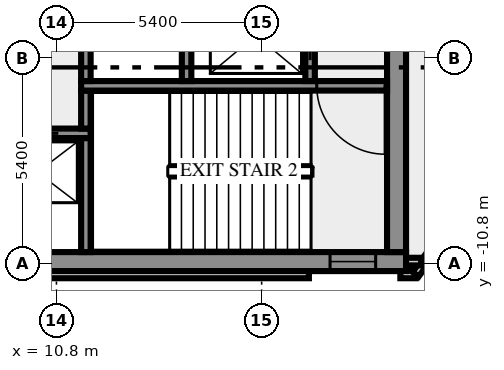
"""IFC4 building model, lengths in metres.
Left out: names, types, materials, properties, quantities, classifications, styles, units other than length and angle.
Written with IfcOpenShell. Run it as: python <this file> out.ifc"""

import sys

from ifc_helpers import new_model, si_unit, direction, frame, frame_2d, origin, place, context, subcontext, project, spatial, rectangle, extrude, element, fill, save


model = new_model("IFC4")
c1 = context("Model", 3, precision=1e-05, world=origin(), true_north=direction((0.0, 1.0)))
c2 = subcontext(c1, "Body", "Model", "MODEL_VIEW")
j1 = project(units=[si_unit("LENGTHUNIT", "METRE"), si_unit("PLANEANGLEUNIT", "RADIAN")], contexts=[c1])
p1 = place(None, origin())
s1 = spatial("IfcSite", under=j1, at=p1, CompositionType="ELEMENT")
p2 = place(p1, origin())
s2 = spatial("IfcBuilding", under=s1, at=p2, CompositionType="ELEMENT")
p3 = place(p2, frame((0.0, 0.0, 160.0)))
s3 = spatial("IfcBuildingStorey", under=s2, at=p3, CompositionType="ELEMENT", Elevation=160.0)
p4 = place(p3, frame((-17.444, -11.088, 0.0), z_axis=(0.0, 0.0, 1.0), x_axis=(1.0, 0.0, 0.0)))
e1 = element("IfcWall", 1, at=p4, inside=s3, PredefinedType="SOLIDWALL", context=c2, shape_type="SweptSolid", body=[
    extrude(rectangle(XDim=34.888, YDim=0.2, at=frame_2d((17.444, 0.0))), origin(), (0.0, 0.0, 1.0), 3.65),
])
p5 = place(p3, frame((19.85, -11.088, 0.0), z_axis=(0.0, 0.0, 1.0), x_axis=(1.0, 0.0, 0.0)))
e2 = element("IfcWall", 2, at=p5, inside=s3, PredefinedType="SOLIDWALL", context=c2, shape_type="SweptSolid", body=[
    extrude(rectangle(XDim=0.406, YDim=0.2, at=frame_2d((0.203, 0.0))), origin(), (0.0, 0.0, 1.0), 3.65),
])
p6 = place(p3, frame((20.253, -11.083, 0.0), z_axis=(0.0, 0.0, 1.0), x_axis=(0.587766567315, 0.809030569476, 0.0)))
e3 = element("IfcWall", 3, at=p6, inside=s3, PredefinedType="SOLIDWALL", context=c2, shape_type="SweptSolid", body=[
    extrude(rectangle(XDim=2.688, YDim=0.2, at=frame_2d((1.344, 0.0))), origin(), (0.0, 0.0, 1.0), 3.65),
])
p7 = place(p3, frame((19.98, -10.75, 0.0), z_axis=(0.0, 0.0, 1.0), x_axis=(1.0, 0.0, 0.0)))
e4 = element("IfcWall", 4, at=p7, inside=s3, PredefinedType="SOLIDWALL", context=c2, shape_type="SweptSolid", body=[
    extrude(rectangle(XDim=0.417, YDim=0.2, at=frame_2d((0.208, 0.0))), origin(), (0.0, 0.0, 1.0), 3.65),
])
p8 = place(p3, frame((-20.0, -10.75, 0.0), z_axis=(0.0, 0.0, 1.0), x_axis=(1.0, 0.0, 0.0)))
e5 = element("IfcWall", 5, at=p8, inside=s3, PredefinedType="SHEAR", context=c2, shape_type="SweptSolid", body=[
    extrude(rectangle(XDim=40.0, YDim=0.5, at=frame_2d((20.0, 0.0))), origin(), (0.0, 0.0, 1.0), 3.65),
])
p9 = place(p8, frame((0.8, 0.0, 1.0)))
e6 = element("IfcOpeningElement", 6, at=p9, cuts=e5, PredefinedType="OPENING", context=c2, shape_type="SweptSolid", body=[
    extrude(rectangle(XDim=1.2, YDim=1.2, at=frame_2d((0.6, 0.6))), frame((0.0, 0.26, 0.0), z_axis=(0.0, -1.0, 0.0), x_axis=(1.0, 0.0, 0.0)), (0.0, 0.0, 1.0), 0.52),
])
p10 = place(p8, frame((38.0, 0.0, 1.0)))
e7 = element("IfcOpeningElement", 7, at=p10, cuts=e5, PredefinedType="OPENING", context=c2, shape_type="SweptSolid", body=[
    extrude(rectangle(XDim=1.2, YDim=1.2, at=frame_2d((0.6, 0.6))), frame((0.0, 0.26, 0.0), z_axis=(0.0, -1.0, 0.0), x_axis=(1.0, 0.0, 0.0)), (0.0, 0.0, 1.0), 0.52),
])
p11 = place(p3, frame((11.575, -10.5, 0.0), z_axis=(0.0, 0.0, 1.0), x_axis=(0.0, 1.0, 0.0)))
e8 = element("IfcWall", 8, at=p11, inside=s3, PredefinedType="SHEAR", context=c2, shape_type="SweptSolid", body=[
    extrude(rectangle(XDim=3.0, YDim=0.25, at=frame_2d((1.5, 0.0))), origin(), (0.0, 0.0, 1.0), 3.65),
])
p12 = place(p3, frame((19.75, -10.5, 0.0), z_axis=(0.0, 0.0, 1.0), x_axis=(0.0, 1.0, 0.0)))
e9 = element("IfcWall", 9, at=p12, inside=s3, PredefinedType="SHEAR", context=c2, shape_type="SweptSolid", body=[
    extrude(rectangle(XDim=8.8, YDim=0.5, at=frame_2d((4.4, 0.0))), origin(), (0.0, 0.0, 1.0), 3.65),
])
p13 = place(p3, frame((11.7, -7.375, 0.0), z_axis=(0.0, 0.0, 1.0), x_axis=(-1.0, 0.0, 0.0)))
e10 = element("IfcWall", 10, at=p13, inside=s3, PredefinedType="SHEAR", context=c2, shape_type="SweptSolid", body=[
    extrude(rectangle(XDim=23.4, YDim=0.25, at=frame_2d((11.7, 0.0))), origin(), (0.0, 0.0, 1.0), 3.65),
])
p14 = place(p13, frame((22.012, 0.0, 0.0)))
e11 = element("IfcOpeningElement", 11, at=p14, cuts=e10, PredefinedType="OPENING", context=c2, shape_type="SweptSolid", body=[
    extrude(rectangle(XDim=0.9, YDim=2.1, at=frame_2d((0.45, 1.05))), frame((0.0, 0.135, 0.0), z_axis=(0.0, -1.0, 0.0), x_axis=(1.0, 0.0, 0.0)), (0.0, 0.0, 1.0), 0.27),
])
p15 = place(p13, frame((20.05, 0.0, 0.0)))
e12 = element("IfcOpeningElement", 12, at=p15, cuts=e10, PredefinedType="OPENING", context=c2, shape_type="SweptSolid", body=[
    extrude(rectangle(XDim=0.9, YDim=2.1, at=frame_2d((0.45, 1.05))), frame((0.0, 0.135, 0.0), z_axis=(0.0, -1.0, 0.0), x_axis=(1.0, 0.0, 0.0)), (0.0, 0.0, 1.0), 0.27),
])
p16 = place(p13, frame((17.088, 0.0, 0.0)))
e13 = element("IfcOpeningElement", 13, at=p16, cuts=e10, PredefinedType="OPENING", context=c2, shape_type="SweptSolid", body=[
    extrude(rectangle(XDim=0.9, YDim=2.1, at=frame_2d((0.45, 1.05))), frame((0.0, 0.135, 0.0), z_axis=(0.0, -1.0, 0.0), x_axis=(1.0, 0.0, 0.0)), (0.0, 0.0, 1.0), 0.27),
])
p17 = place(p13, frame((14.45, 0.0, 0.0)))
e14 = element("IfcOpeningElement", 14, at=p17, cuts=e10, PredefinedType="OPENING", context=c2, shape_type="SweptSolid", body=[
    extrude(rectangle(XDim=0.9, YDim=2.1, at=frame_2d((0.45, 1.05))), frame((0.0, 0.135, 0.0), z_axis=(0.0, -1.0, 0.0), x_axis=(1.0, 0.0, 0.0)), (0.0, 0.0, 1.0), 0.27),
])
p18 = place(p13, frame((12.95, 0.0, 0.0)))
e15 = element("IfcOpeningElement", 15, at=p18, cuts=e10, PredefinedType="OPENING", context=c2, shape_type="SweptSolid", body=[
    extrude(rectangle(XDim=0.9, YDim=2.1, at=frame_2d((0.45, 1.05))), frame((0.0, 0.135, 0.0), z_axis=(0.0, -1.0, 0.0), x_axis=(1.0, 0.0, 0.0)), (0.0, 0.0, 1.0), 0.27),
])
p19 = place(p13, frame((11.475, 0.0, 0.0)))
e16 = element("IfcOpeningElement", 16, at=p19, cuts=e10, PredefinedType="OPENING", context=c2, shape_type="SweptSolid", body=[
    extrude(rectangle(XDim=0.9, YDim=2.1, at=frame_2d((0.45, 1.05))), frame((0.0, 0.135, 0.0), z_axis=(0.0, -1.0, 0.0), x_axis=(1.0, 0.0, 0.0)), (0.0, 0.0, 1.0), 0.27),
])
p20 = place(p13, frame((10.45, 0.0, 0.0)))
e17 = element("IfcOpeningElement", 17, at=p20, cuts=e10, PredefinedType="OPENING", context=c2, shape_type="SweptSolid", body=[
    extrude(rectangle(XDim=0.5, YDim=2.1, at=frame_2d((0.25, 1.05))), frame((0.0, 0.135, 0.0), z_axis=(0.0, -1.0, 0.0), x_axis=(1.0, 0.0, 0.0)), (0.0, 0.0, 1.0), 0.27),
])
p21 = place(p13, frame((8.35, 0.0, 0.0)))
e18 = element("IfcOpeningElement", 18, at=p21, cuts=e10, PredefinedType="OPENING", context=c2, shape_type="SweptSolid", body=[
    extrude(rectangle(XDim=1.1, YDim=2.1, at=frame_2d((0.55, 1.05))), frame((0.0, 0.135, 0.0), z_axis=(0.0, -1.0, 0.0), x_axis=(1.0, 0.0, 0.0)), (0.0, 0.0, 1.0), 0.27),
])
p22 = place(p13, frame((5.85, 0.0, 0.0)))
e19 = element("IfcOpeningElement", 19, at=p22, cuts=e10, PredefinedType="OPENING", context=c2, shape_type="SweptSolid", body=[
    extrude(rectangle(XDim=1.1, YDim=2.1, at=frame_2d((0.55, 1.05))), frame((0.0, 0.135, 0.0), z_axis=(0.0, -1.0, 0.0), x_axis=(1.0, 0.0, 0.0)), (0.0, 0.0, 1.0), 0.27),
])
p23 = place(p13, frame((3.35, 0.0, 0.0)))
e20 = element("IfcOpeningElement", 20, at=p23, cuts=e10, PredefinedType="OPENING", context=c2, shape_type="SweptSolid", body=[
    extrude(rectangle(XDim=1.1, YDim=2.1, at=frame_2d((0.55, 1.05))), frame((0.0, 0.135, 0.0), z_axis=(0.0, -1.0, 0.0), x_axis=(1.0, 0.0, 0.0)), (0.0, 0.0, 1.0), 0.27),
])
p24 = place(p13, frame((0.85, 0.0, 0.0)))
e21 = element("IfcOpeningElement", 21, at=p24, cuts=e10, PredefinedType="OPENING", context=c2, shape_type="SweptSolid", body=[
    extrude(rectangle(XDim=1.1, YDim=2.1, at=frame_2d((0.55, 1.05))), frame((0.0, 0.135, 0.0), z_axis=(0.0, -1.0, 0.0), x_axis=(1.0, 0.0, 0.0)), (0.0, 0.0, 1.0), 0.27),
])
p25 = place(p3, frame((11.575, -7.25, 0.0), z_axis=(0.0, 0.0, 1.0), x_axis=(0.0, 1.0, 0.0)))
e22 = element("IfcWall", 22, at=p25, inside=s3, PredefinedType="SHEAR", context=c2, shape_type="SweptSolid", body=[
    extrude(rectangle(XDim=1.0, YDim=0.25, at=frame_2d((0.5, 0.0))), origin(), (0.0, 0.0, 1.0), 3.65),
])
p26 = place(p3, frame((19.5, -6.125, 0.0), z_axis=(0.0, 0.0, 1.0), x_axis=(-1.0, 0.0, 0.0)))
e23 = element("IfcWall", 23, at=p26, inside=s3, PredefinedType="SHEAR", context=c2, shape_type="SweptSolid", body=[
    extrude(rectangle(XDim=8.05, YDim=0.25, at=frame_2d((4.025, 0.0))), origin(), (0.0, 0.0, 1.0), 3.65),
])
p27 = place(p26, frame((0.05, 0.0, 0.0)))
e24 = element("IfcOpeningElement", 24, at=p27, cuts=e23, PredefinedType="OPENING", context=c2, shape_type="SweptSolid", body=[
    extrude(rectangle(XDim=1.8, YDim=2.1, at=frame_2d((0.9, 1.05))), frame((0.0, 0.135, 0.0), z_axis=(0.0, -1.0, 0.0), x_axis=(1.0, 0.0, 0.0)), (0.0, 0.0, 1.0), 0.27),
])
p28 = place(p3, frame((11.575, -6.0, 0.0), z_axis=(0.0, 0.0, 1.0), x_axis=(0.0, 1.0, 0.0)))
e25 = element("IfcWall", 25, at=p28, inside=s3, PredefinedType="SHEAR", context=c2, shape_type="SweptSolid", body=[
    extrude(rectangle(XDim=1.75, YDim=0.25, at=frame_2d((0.875, 0.0))), origin(), (0.0, 0.0, 1.0), 3.65),
])
p29 = place(p3, frame((14.225, -6.0, 0.0), z_axis=(0.0, 0.0, 1.0), x_axis=(0.0, 1.0, 0.0)))
e26 = element("IfcWall", 26, at=p29, inside=s3, PredefinedType="SHEAR", context=c2, shape_type="SweptSolid", body=[
    extrude(rectangle(XDim=4.3, YDim=0.25, at=frame_2d((2.15, 0.0))), origin(), (0.0, 0.0, 1.0), 3.65),
])
p30 = place(p3, frame((17.475, -6.0, 0.0), z_axis=(0.0, 0.0, 1.0), x_axis=(0.0, 1.0, 0.0)))
e27 = element("IfcWall", 27, at=p30, inside=s3, PredefinedType="SHEAR", context=c2, shape_type="SweptSolid", body=[
    extrude(rectangle(XDim=4.3, YDim=0.25, at=frame_2d((2.15, 0.0))), origin(), (0.0, 0.0, 1.0), 3.65),
])
p31 = place(p30, frame((0.55, 0.0, 0.0)))
e28 = element("IfcOpeningElement", 28, at=p31, cuts=e27, PredefinedType="OPENING", context=c2, shape_type="SweptSolid", body=[
    extrude(rectangle(XDim=1.3, YDim=2.1, at=frame_2d((0.65, 1.05))), frame((0.0, 0.135, 0.0), z_axis=(0.0, -1.0, 0.0), x_axis=(1.0, 0.0, 0.0)), (0.0, 0.0, 1.0), 0.27),
])
p32 = place(p10, origin())
e29 = element("IfcWindow", 29, at=p32, inside=s3, PartitioningType="SINGLE_PANEL", PredefinedType="WINDOW", context=c2, shape_type="SweptSolid", body=[
    extrude(rectangle(XDim=1.2, YDim=1.2, at=frame_2d((0.6, 0.6))), frame((0.0, 0.03, 0.0), z_axis=(0.0, -1.0, 0.0), x_axis=(1.0, 0.0, 0.0)), (0.0, 0.0, 1.0), 0.06),
])
fill(e7, e29)
p33 = place(p24, origin())
e30 = element("IfcDoor", 30, at=p33, inside=s3, OperationType="DOUBLE_DOOR_SLIDING", PredefinedType="DOOR", context=c2, shape_type="SweptSolid", body=[
    extrude(rectangle(XDim=1.1, YDim=2.1, at=frame_2d((0.55, 1.05))), frame((0.0, 0.025, 0.0), z_axis=(0.0, -1.0, 0.0), x_axis=(1.0, 0.0, 0.0)), (0.0, 0.0, 1.0), 0.05),
])
fill(e21, e30)
p34 = place(p27, origin())
e31 = element("IfcDoor", 31, at=p34, inside=s3, OperationType="DOUBLE_DOOR_SINGLE_SWING", PredefinedType="DOOR", context=c2, shape_type="SweptSolid", body=[
    extrude(rectangle(XDim=1.8, YDim=2.1, at=frame_2d((0.9, 1.05))), frame((0.0, 0.025, 0.0), z_axis=(0.0, -1.0, 0.0), x_axis=(1.0, 0.0, 0.0)), (0.0, 0.0, 1.0), 0.05),
])
fill(e24, e31)
p35 = place(p31, origin())
e32 = element("IfcDoor", 32, at=p35, inside=s3, OperationType="DOUBLE_DOOR_SLIDING", PredefinedType="DOOR", context=c2, shape_type="SweptSolid", body=[
    extrude(rectangle(XDim=1.3, YDim=2.1, at=frame_2d((0.65, 1.05))), frame((0.0, 0.025, 0.0), z_axis=(0.0, -1.0, 0.0), x_axis=(1.0, 0.0, 0.0)), (0.0, 0.0, 1.0), 0.05),
])
fill(e28, e32)
save(model, sys.argv[1])
